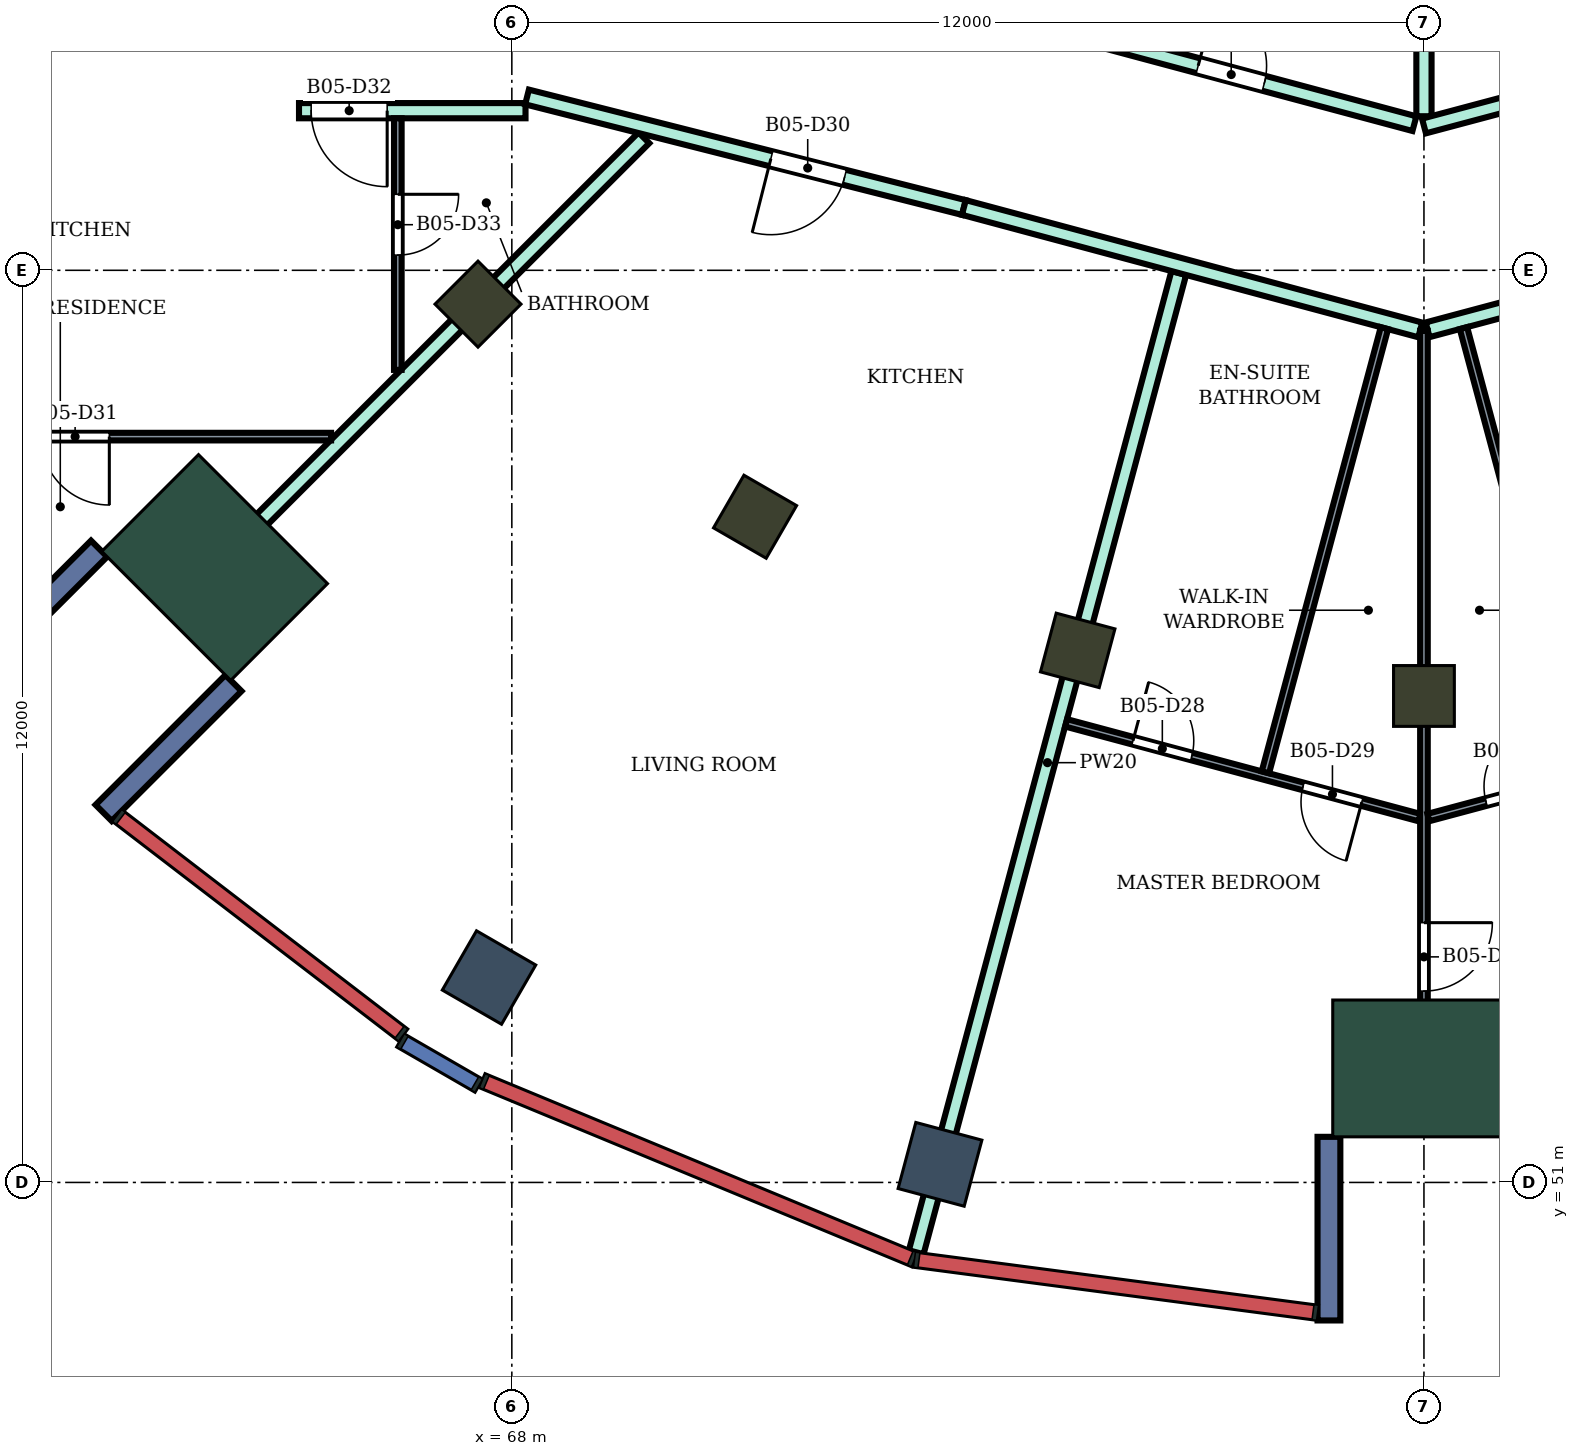
"""IFC4 building model, lengths in metres.
Left out: names, types, materials, properties, quantities, classifications, styles, units other than length and angle.
Written with IfcOpenShell. Run it as: python <this file> out.ifc"""

import sys

from ifc_helpers import new_model, si_unit, direction, frame, frame_2d, origin, origin_2d, place, context, subcontext, project, spatial, rectangle, extrude, element, fill, save


model = new_model("IFC4")
c1 = context("Model", 3, precision=1e-05, world=origin(), true_north=direction((0.0, 1.0)))
c2 = subcontext(c1, "Body", "Model", "MODEL_VIEW")
j1 = project(units=[si_unit("LENGTHUNIT", "METRE"), si_unit("PLANEANGLEUNIT", "RADIAN")], contexts=[c1])
p1 = place(None, origin())
s1 = spatial("IfcSite", under=j1, at=p1, CompositionType="ELEMENT")
p2 = place(p1, origin())
s2 = spatial("IfcBuilding", under=s1, at=p2, CompositionType="ELEMENT")
p3 = place(p2, frame((0.0, 0.0, 266.7)))
s3 = spatial("IfcBuildingStorey", under=s2, at=p3, CompositionType="ELEMENT", Elevation=266.7)
for number, where, z_axis, x_axis in (
    (1, (67.7, 53.696, 0.0), (0.0, 0.0, 1.0), (-0.5, -0.866, 0.0)),
    (2, (73.633, 51.238, 0.0), (0.0, 0.0, 1.0), (-0.259, -0.966, 0.0)),
):
    element("IfcColumn", number, at=place(p3, frame(where, z_axis=z_axis, x_axis=x_axis)), inside=s3, PredefinedType="COLUMN", context=c2, shape_type="SweptSolid", body=[
        extrude(rectangle(XDim=0.9, YDim=0.9, at=origin_2d()), origin(), (0.0, 0.0, 1.0), 4.2),
    ])
for number, where, z_axis, x_axis in (
    (3, (67.555, 62.555, 0.0), (0.0, 0.0, 1.0), (-0.707, -0.707, 0.0)),
    (4, (71.2, 59.758, 0.0), (0.0, 0.0, 1.0), (-0.5, -0.866, 0.0)),
    (5, (75.445, 58.0, 0.0), (0.0, 0.0, 1.0), (-0.259, -0.966, 0.0)),
    (6, (80.0, 57.4, 0.0), (0.0, 0.0, 1.0), (0.0, -1.0, 0.0)),
):
    element("IfcColumn", number, at=place(p3, frame(where, z_axis=z_axis, x_axis=x_axis)), inside=s3, PredefinedType="COLUMN", context=c2, shape_type="SweptSolid", body=[
        extrude(rectangle(XDim=0.8, YDim=0.8, at=origin_2d()), origin(), (0.0, 0.0, 1.0), 4.2),
    ])
for number, where, z_axis, x_axis in (
    (7, (64.09, 59.09, 0.0), (0.0, 0.0, 1.0), (-0.707, -0.707, 0.0)),
    (8, (80.0, 52.5, 0.0), (0.0, 0.0, 1.0), (0.0, -1.0, 0.0)),
):
    element("IfcColumn", number, at=place(p3, frame(where, z_axis=z_axis, x_axis=x_axis)), inside=s3, PredefinedType="COLUMN", context=c2, shape_type="SweptSolid", body=[
        extrude(rectangle(XDim=1.8, YDim=2.4, at=origin_2d()), origin(), (0.0, 0.0, 1.0), 4.2),
    ])
for number, where, z_axis, x_axis in (
    (9, (62.57, 59.338, 0.0), (0.0, 0.0, 1.0), (-0.707, -0.707, 0.0)),
    (10, (64.338, 57.57, 0.0), (0.0, 0.0, 1.0), (-0.707, -0.707, 0.0)),
    (11, (78.75, 51.6, 0.0), (0.0, 0.0, 1.0), (0.0, -1.0, 0.0)),
):
    element("IfcWall", number, at=place(p3, frame(where, z_axis=z_axis, x_axis=x_axis)), inside=s3, PredefinedType="NOTDEFINED", context=c2, shape_type="SweptSolid", body=[
        extrude(rectangle(XDim=2.416, YDim=0.3, at=frame_2d((1.208, 0.0))), origin(), (0.0, 0.0, 1.0), 4.2),
    ])
p4 = place(p3, frame((63.592, 58.6, 0.0), z_axis=(0.0, 0.0, 1.0), x_axis=(0.707261286313, 0.706952242293, 0.0)))
e12 = element("IfcWall", 12, at=p4, inside=s3, PredefinedType="PARTITIONING", context=c2, shape_type="SweptSolid", body=[
    extrude(rectangle(XDim=8.69, YDim=0.2, at=frame_2d((4.345, 0.0))), origin(), (0.0, 0.0, 1.0), 3.75),
])
p5 = place(p3, frame((65.2, 65.1, 0.0), z_axis=(0.0, 0.0, 1.0), x_axis=(1.0, 0.0, 0.0)))
e13 = element("IfcWall", 13, at=p5, inside=s3, PredefinedType="PARTITIONING", context=c2, shape_type="SweptSolid", body=[
    extrude(rectangle(XDim=2.98, YDim=0.2, at=frame_2d((1.49, 0.0))), origin(), (0.0, 0.0, 1.0), 3.75),
])
p6 = place(p5, frame((0.16, 0.0, 0.0)))
e14 = element("IfcOpeningElement", 14, at=p6, cuts=e13, PredefinedType="OPENING", context=c2, shape_type="SweptSolid", body=[
    extrude(rectangle(XDim=1.0, YDim=2.1, at=frame_2d((0.5, 1.05))), frame((0.0, 0.11, 0.0), z_axis=(0.0, -1.0, 0.0), x_axis=(1.0, 0.0, 0.0)), (0.0, 0.0, 1.0), 0.22),
])
p7 = place(p3, frame((68.2, 65.28, 0.0), z_axis=(0.0, 0.0, 1.0), x_axis=(0.969428528216, -0.245373854926, 0.0)))
e15 = element("IfcWall", 15, at=p7, inside=s3, PredefinedType="PARTITIONING", context=c2, shape_type="SweptSolid", body=[
    extrude(rectangle(XDim=5.928, YDim=0.2, at=frame_2d((2.964, 0.0))), origin(), (0.0, 0.0, 1.0), 3.75),
])
p8 = place(p7, frame((3.309, 0.0, 0.0)))
e16 = element("IfcOpeningElement", 16, at=p8, cuts=e15, PredefinedType="OPENING", context=c2, shape_type="SweptSolid", body=[
    extrude(rectangle(XDim=1.0, YDim=2.1, at=frame_2d((0.5, 1.05))), frame((0.0, 0.11, 0.0), z_axis=(0.0, -1.0, 0.0), x_axis=(1.0, 0.0, 0.0)), (0.0, 0.0, 1.0), 0.22),
])
p9 = place(p3, frame((73.32, 50.082, 0.0), z_axis=(0.0, 0.0, 1.0), x_axis=(0.258966962665, 0.965886179758, 0.0)))
e17 = element("IfcWall", 17, at=p9, inside=s3, PredefinedType="PARTITIONING", context=c2, shape_type="SweptSolid", body=[
    extrude(rectangle(XDim=13.337, YDim=0.2, at=frame_2d((6.668, 0.0))), origin(), (0.0, 0.0, 1.0), 3.75),
])
p10 = place(p3, frame((73.947, 63.826, 0.0), z_axis=(0.0, 0.0, 1.0), x_axis=(0.965856500469, -0.259077634122, 0.0)))
e18 = element("IfcWall", 18, at=p10, inside=s3, PredefinedType="PARTITIONING", context=c2, shape_type="SweptSolid", body=[
    extrude(rectangle(XDim=6.217, YDim=0.2, at=frame_2d((3.108, 0.0))), origin(), (0.0, 0.0, 1.0), 3.75),
])
p11 = place(p3, frame((74.603, 66.342, 0.0), z_axis=(0.0, 0.0, 1.0), x_axis=(0.965920893652, -0.258837453254, 0.0)))
e19 = element("IfcWall", 19, at=p11, inside=s3, PredefinedType="PARTITIONING", context=c2, shape_type="SweptSolid", body=[
    extrude(rectangle(XDim=5.458, YDim=0.2, at=frame_2d((2.729, 0.0))), origin(), (0.0, 0.0, 1.0), 3.75),
])
p12 = place(p11, frame((2.512, 0.0, 0.0)))
e20 = element("IfcOpeningElement", 20, at=p12, cuts=e19, PredefinedType="OPENING", context=c2, shape_type="SweptSolid", body=[
    extrude(rectangle(XDim=0.9, YDim=2.1, at=frame_2d((0.45, 1.05))), frame((0.0, 0.11, 0.0), z_axis=(0.0, -1.0, 0.0), x_axis=(1.0, 0.0, 0.0)), (0.0, 0.0, 1.0), 0.22),
])
p13 = place(p3, frame((80.048, 62.217, 0.0), z_axis=(0.0, 0.0, 1.0), x_axis=(0.966097920642, 0.258175923996, 0.0)))
e21 = element("IfcWall", 21, at=p13, inside=s3, PredefinedType="PARTITIONING", context=c2, shape_type="SweptSolid", body=[
    extrude(rectangle(XDim=6.217, YDim=0.2, at=frame_2d((3.108, 0.0))), origin(), (0.0, 0.0, 1.0), 3.75),
])
p14 = place(p13, frame((3.792, 0.0, 0.0)))
e22 = element("IfcOpeningElement", 22, at=p14, cuts=e21, PredefinedType="OPENING", context=c2, shape_type="SweptSolid", body=[
    extrude(rectangle(XDim=1.0, YDim=2.1, at=frame_2d((0.5, 1.05))), frame((0.0, 0.11, 0.0), z_axis=(0.0, -1.0, 0.0), x_axis=(1.0, 0.0, 0.0)), (0.0, 0.0, 1.0), 0.22),
])
p15 = place(p3, frame((80.0, 65.027, 0.0), z_axis=(0.0, 0.0, 1.0), x_axis=(0.0, 1.0, 0.0)))
e23 = element("IfcWall", 23, at=p15, inside=s3, PredefinedType="PARTITIONING", context=c2, shape_type="SweptSolid", body=[
    extrude(rectangle(XDim=2.273, YDim=0.2, at=frame_2d((1.136, 0.0))), origin(), (0.0, 0.0, 1.0), 3.75),
])
p16 = place(p3, frame((80.0, 64.898, 0.0), z_axis=(0.0, 0.0, 1.0), x_axis=(0.966236923997, 0.25765520896, 0.0)))
e24 = element("IfcWall", 24, at=p16, inside=s3, PredefinedType="PARTITIONING", context=c2, shape_type="SweptSolid", body=[
    extrude(rectangle(XDim=8.168, YDim=0.2, at=frame_2d((4.084, 0.0))), origin(), (0.0, 0.0, 1.0), 3.75),
])
p17 = place(p16, frame((1.893, 0.0, 0.0)))
e25 = element("IfcOpeningElement", 25, at=p17, cuts=e24, PredefinedType="OPENING", context=c2, shape_type="SweptSolid", body=[
    extrude(rectangle(XDim=1.8, YDim=2.1, at=frame_2d((0.9, 1.05))), frame((0.0, 0.11, 0.0), z_axis=(0.0, -1.0, 0.0), x_axis=(1.0, 0.0, 0.0)), (0.0, 0.0, 1.0), 0.22),
])
p18 = place(p3, frame((58.6, 60.812, 0.0), z_axis=(0.0, 0.0, 1.0), x_axis=(1.0, 0.0, 0.0)))
e26 = element("IfcWall", 26, at=p18, inside=s3, PredefinedType="PARTITIONING", context=c2, shape_type="SweptSolid", body=[
    extrude(rectangle(XDim=7.022, YDim=0.1, at=frame_2d((3.511, 0.0))), origin(), (0.0, 0.0, 1.0), 3.75),
])
p19 = place(p18, frame((3.205, 0.0, 0.0)))
e27 = element("IfcOpeningElement", 27, at=p19, cuts=e26, PredefinedType="OPENING", context=c2, shape_type="SweptSolid", body=[
    extrude(rectangle(XDim=0.9, YDim=2.1, at=frame_2d((0.45, 1.05))), frame((0.0, 0.06, 0.0), z_axis=(0.0, -1.0, 0.0), x_axis=(1.0, 0.0, 0.0)), (0.0, 0.0, 1.0), 0.12),
])
p20 = place(p3, frame((66.5, 61.69, 0.0), z_axis=(0.0, 0.0, 1.0), x_axis=(0.0, 1.0, 0.0)))
e28 = element("IfcWall", 28, at=p20, inside=s3, PredefinedType="PARTITIONING", context=c2, shape_type="SweptSolid", body=[
    extrude(rectangle(XDim=3.31, YDim=0.1, at=frame_2d((1.655, 0.0))), origin(), (0.0, 0.0, 1.0), 3.75),
])
p21 = place(p20, frame((1.51, 0.0, 0.0)))
e29 = element("IfcOpeningElement", 29, at=p21, cuts=e28, PredefinedType="OPENING", context=c2, shape_type="SweptSolid", body=[
    extrude(rectangle(XDim=0.8, YDim=2.1, at=frame_2d((0.4, 1.05))), frame((0.0, 0.06, 0.0), z_axis=(0.0, -1.0, 0.0), x_axis=(1.0, 0.0, 0.0)), (0.0, 0.0, 1.0), 0.12),
])
p22 = place(p3, frame((75.293, 57.046, 0.0), z_axis=(0.0, 0.0, 1.0), x_axis=(0.965904119246, -0.258900043306, 0.0)))
e30 = element("IfcWall", 30, at=p22, inside=s3, PredefinedType="PARTITIONING", context=c2, shape_type="SweptSolid", body=[
    extrude(rectangle(XDim=4.813, YDim=0.1, at=frame_2d((2.406, 0.0))), origin(), (0.0, 0.0, 1.0), 3.75),
])
p23 = place(p22, frame((0.91, 0.0, 0.0)))
e31 = element("IfcOpeningElement", 31, at=p23, cuts=e30, PredefinedType="OPENING", context=c2, shape_type="SweptSolid", body=[
    extrude(rectangle(XDim=0.8, YDim=2.1, at=frame_2d((0.4, 1.05))), frame((0.0, 0.06, 0.0), z_axis=(0.0, -1.0, 0.0), x_axis=(1.0, 0.0, 0.0)), (0.0, 0.0, 1.0), 0.12),
])
p24 = place(p22, frame((3.227, 0.0, 0.0)))
e32 = element("IfcOpeningElement", 32, at=p24, cuts=e30, PredefinedType="OPENING", context=c2, shape_type="SweptSolid", body=[
    extrude(rectangle(XDim=0.8, YDim=2.1, at=frame_2d((0.4, 1.05))), frame((0.0, 0.06, 0.0), z_axis=(0.0, -1.0, 0.0), x_axis=(1.0, 0.0, 0.0)), (0.0, 0.0, 1.0), 0.12),
])
p25 = place(p3, frame((77.914, 56.396, 0.0), z_axis=(0.0, 0.0, 1.0), x_axis=(0.258822816874, 0.965924815638, 0.0)))
e33 = element("IfcWall", 33, at=p25, inside=s3, PredefinedType="PARTITIONING", context=c2, shape_type="SweptSolid", body=[
    extrude(rectangle(XDim=6.05, YDim=0.1, at=frame_2d((3.025, 0.0))), origin(), (0.0, 0.0, 1.0), 3.75),
])
p26 = place(p3, frame((80.0, 51.8, 0.0), z_axis=(0.0, 0.0, 1.0), x_axis=(0.0, 1.0, 0.0)))
e34 = element("IfcWall", 34, at=p26, inside=s3, PredefinedType="PARTITIONING", context=c2, shape_type="SweptSolid", body=[
    extrude(rectangle(XDim=10.404, YDim=0.1, at=frame_2d((5.202, 0.0))), origin(), (0.0, 0.0, 1.0), 3.75),
])
p27 = place(p26, frame((1.718, 0.0, 0.0)))
e35 = element("IfcOpeningElement", 35, at=p27, cuts=e34, PredefinedType="OPENING", context=c2, shape_type="SweptSolid", body=[
    extrude(rectangle(XDim=0.9, YDim=2.1, at=frame_2d((0.45, 1.05))), frame((0.0, 0.06, 0.0), z_axis=(0.0, -1.0, 0.0), x_axis=(1.0, 0.0, 0.0)), (0.0, 0.0, 1.0), 0.12),
])
p28 = place(p3, frame((80.058, 55.801, 0.0), z_axis=(0.0, 0.0, 1.0), x_axis=(0.965968926881, 0.258658137896, 0.0)))
e36 = element("IfcWall", 36, at=p28, inside=s3, PredefinedType="PARTITIONING", context=c2, shape_type="SweptSolid", body=[
    extrude(rectangle(XDim=4.854, YDim=0.1, at=frame_2d((2.427, 0.0))), origin(), (0.0, 0.0, 1.0), 3.75),
])
p29 = place(p28, frame((0.786, 0.0, 0.0)))
e37 = element("IfcOpeningElement", 37, at=p29, cuts=e36, PredefinedType="OPENING", context=c2, shape_type="SweptSolid", body=[
    extrude(rectangle(XDim=0.8, YDim=2.1, at=frame_2d((0.4, 1.05))), frame((0.0, 0.06, 0.0), z_axis=(0.0, -1.0, 0.0), x_axis=(1.0, 0.0, 0.0)), (0.0, 0.0, 1.0), 0.12),
])
p30 = place(p3, frame((80.52, 62.24, 0.0), z_axis=(0.0, 0.0, 1.0), x_axis=(0.258822816874, -0.965924815638, 0.0)))
e38 = element("IfcWall", 38, at=p30, inside=s3, PredefinedType="PARTITIONING", context=c2, shape_type="SweptSolid", body=[
    extrude(rectangle(XDim=6.05, YDim=0.1, at=frame_2d((3.025, 0.0))), origin(), (0.0, 0.0, 1.0), 3.75),
])
p31 = place(p29, origin())
e39 = element("IfcDoor", 39, at=p31, inside=s3, OperationType="SINGLE_SWING_RIGHT", PredefinedType="DOOR", context=c2, shape_type="SweptSolid", body=[
    extrude(rectangle(XDim=0.8, YDim=2.1, at=frame_2d((0.4, 1.05))), frame((0.0, 0.025, 0.0), z_axis=(0.0, -1.0, 0.0), x_axis=(1.0, 0.0, 0.0)), (0.0, 0.0, 1.0), 0.05),
])
fill(e37, e39)
p32 = place(p27, frame((0.9, 0.0, 0.0), z_axis=(0.0, 0.0, 1.0), x_axis=(-1.0, 0.0, 0.0)))
e40 = element("IfcDoor", 40, at=p32, inside=s3, OperationType="SINGLE_SWING_LEFT", PredefinedType="DOOR", context=c2, shape_type="SweptSolid", body=[
    extrude(rectangle(XDim=0.9, YDim=2.1, at=frame_2d((0.45, 1.05))), frame((0.0, 0.025, 0.0), z_axis=(0.0, -1.0, 0.0), x_axis=(1.0, 0.0, 0.0)), (0.0, 0.0, 1.0), 0.05),
])
fill(e35, e40)
p33 = place(p23, origin())
e41 = element("IfcDoor", 41, at=p33, inside=s3, OperationType="SINGLE_SWING_LEFT", PredefinedType="DOOR", context=c2, shape_type="SweptSolid", body=[
    extrude(rectangle(XDim=0.8, YDim=2.1, at=frame_2d((0.4, 1.05))), frame((0.0, 0.025, 0.0), z_axis=(0.0, -1.0, 0.0), x_axis=(1.0, 0.0, 0.0)), (0.0, 0.0, 1.0), 0.05),
])
fill(e31, e41)
p34 = place(p24, frame((0.8, 0.0, 0.0), z_axis=(0.0, 0.0, 1.0), x_axis=(-1.0, 0.0, 0.0)))
e42 = element("IfcDoor", 42, at=p34, inside=s3, OperationType="SINGLE_SWING_LEFT", PredefinedType="DOOR", context=c2, shape_type="SweptSolid", body=[
    extrude(rectangle(XDim=0.8, YDim=2.1, at=frame_2d((0.4, 1.05))), frame((0.0, 0.025, 0.0), z_axis=(0.0, -1.0, 0.0), x_axis=(1.0, 0.0, 0.0)), (0.0, 0.0, 1.0), 0.05),
])
fill(e32, e42)
p35 = place(p8, frame((1.0, 0.0, 0.0), z_axis=(0.0, 0.0, 1.0), x_axis=(-1.0, 0.0, 0.0)))
e43 = element("IfcDoor", 43, at=p35, inside=s3, OperationType="SINGLE_SWING_RIGHT", PredefinedType="DOOR", context=c2, shape_type="SweptSolid", body=[
    extrude(rectangle(XDim=1.0, YDim=2.1, at=frame_2d((0.5, 1.05))), frame((0.0, 0.025, 0.0), z_axis=(0.0, -1.0, 0.0), x_axis=(1.0, 0.0, 0.0)), (0.0, 0.0, 1.0), 0.05),
])
fill(e16, e43)
p36 = place(p19, frame((0.9, 0.0, 0.0), z_axis=(0.0, 0.0, 1.0), x_axis=(-1.0, 0.0, 0.0)))
e44 = element("IfcDoor", 44, at=p36, inside=s3, OperationType="SINGLE_SWING_LEFT", PredefinedType="DOOR", context=c2, shape_type="SweptSolid", body=[
    extrude(rectangle(XDim=0.9, YDim=2.1, at=frame_2d((0.45, 1.05))), frame((0.0, 0.025, 0.0), z_axis=(0.0, -1.0, 0.0), x_axis=(1.0, 0.0, 0.0)), (0.0, 0.0, 1.0), 0.05),
])
fill(e27, e44)
p37 = place(p6, frame((1.0, 0.0, 0.0), z_axis=(0.0, 0.0, 1.0), x_axis=(-1.0, 0.0, 0.0)))
e45 = element("IfcDoor", 45, at=p37, inside=s3, OperationType="SINGLE_SWING_LEFT", PredefinedType="DOOR", context=c2, shape_type="SweptSolid", body=[
    extrude(rectangle(XDim=1.0, YDim=2.1, at=frame_2d((0.5, 1.05))), frame((0.0, 0.025, 0.0), z_axis=(0.0, -1.0, 0.0), x_axis=(1.0, 0.0, 0.0)), (0.0, 0.0, 1.0), 0.05),
])
fill(e14, e45)
p38 = place(p21, frame((0.8, 0.0, 0.0), z_axis=(0.0, 0.0, 1.0), x_axis=(-1.0, 0.0, 0.0)))
e46 = element("IfcDoor", 46, at=p38, inside=s3, OperationType="SINGLE_SWING_LEFT", PredefinedType="DOOR", context=c2, shape_type="SweptSolid", body=[
    extrude(rectangle(XDim=0.8, YDim=2.1, at=frame_2d((0.4, 1.05))), frame((0.0, 0.025, 0.0), z_axis=(0.0, -1.0, 0.0), x_axis=(1.0, 0.0, 0.0)), (0.0, 0.0, 1.0), 0.05),
])
fill(e29, e46)
p39 = place(p12, origin())
e47 = element("IfcDoor", 47, at=p39, inside=s3, OperationType="SINGLE_SWING_LEFT", PredefinedType="DOOR", context=c2, shape_type="SweptSolid", body=[
    extrude(rectangle(XDim=0.9, YDim=2.1, at=frame_2d((0.45, 1.05))), frame((0.0, 0.025, 0.0), z_axis=(0.0, -1.0, 0.0), x_axis=(1.0, 0.0, 0.0)), (0.0, 0.0, 1.0), 0.05),
])
fill(e20, e47)
save(model, sys.argv[1])
